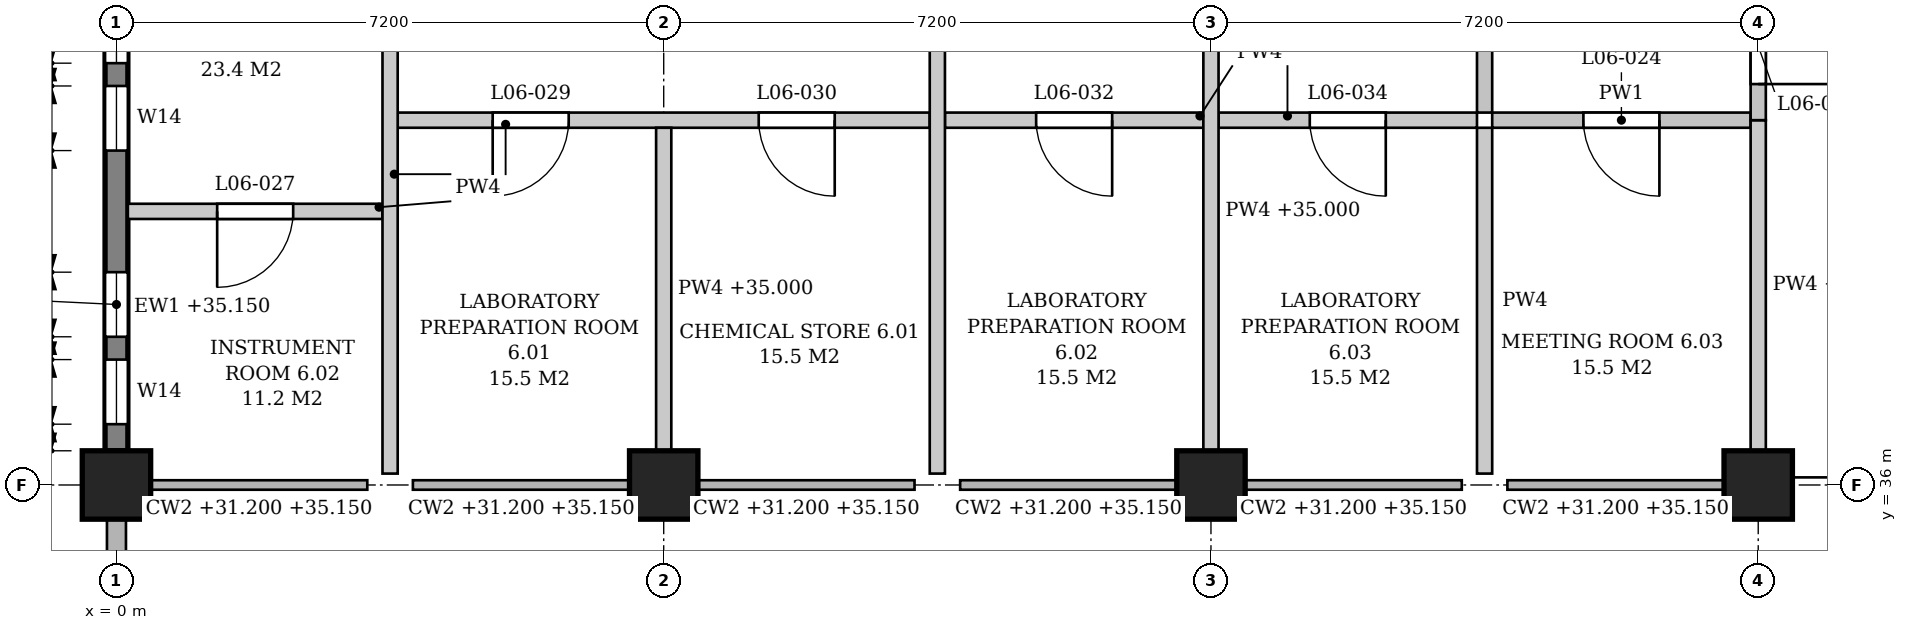
"""IFC4 building model, lengths in metres.
Left out: names, types, materials, properties, quantities, classifications, styles, units other than length and angle.
Written with IfcOpenShell. Run it as: python <this file> out.ifc"""

import sys

from ifc_helpers import new_model, si_unit, direction, frame, frame_2d, origin, origin_2d, place, context, subcontext, project, spatial, polyline, rectangle, outline, extrude, element, fill, save


model = new_model("IFC4")
c1 = context("Model", 3, precision=1e-05, world=origin(), true_north=direction((0.0, 1.0)))
c2 = subcontext(c1, "Body", "Model", "MODEL_VIEW")
j1 = project(units=[si_unit("LENGTHUNIT", "METRE"), si_unit("PLANEANGLEUNIT", "RADIAN")], contexts=[c1])
p1 = place(None, origin())
s1 = spatial("IfcSite", under=j1, at=p1, CompositionType="ELEMENT")
p2 = place(p1, origin())
s2 = spatial("IfcBuilding", under=s1, at=p2, CompositionType="ELEMENT")
p3 = place(p2, frame((0.0, 0.0, 31.2)))
s3 = spatial("IfcBuildingStorey", under=s2, at=p3, CompositionType="ELEMENT", Elevation=31.2)
for number, where, z_axis, x_axis in (
    (1, (0.0, 36.0, 0.0), (0.0, 0.0, 1.0), (1.0, 0.0, 0.0)),
    (2, (7.2, 36.0, 0.0), (0.0, 0.0, 1.0), (1.0, 0.0, 0.0)),
    (3, (14.4, 36.0, 0.0), (0.0, 0.0, 1.0), (1.0, 0.0, 0.0)),
    (4, (21.6, 36.0, 0.0), (0.0, 0.0, 1.0), (1.0, 0.0, 0.0)),
):
    element("IfcColumn", number, at=place(p3, frame(where, z_axis=z_axis, x_axis=x_axis)), inside=s3, PredefinedType="COLUMN", context=c2, shape_type="SweptSolid", body=[
        extrude(rectangle(XDim=0.9, YDim=0.9, at=origin_2d()), origin(), (0.0, 0.0, 1.0), 4.8),
    ])
p4 = place(p3, frame((0.0, 36.45, 0.0), z_axis=(0.0, 0.0, 1.0), x_axis=(0.0, 1.0, 0.0)))
e5 = element("IfcWall", 5, at=p4, inside=s3, PredefinedType="STANDARD", context=c2, shape_type="SweptSolid", body=[
    extrude(rectangle(XDim=6.3, YDim=0.3, at=frame_2d((3.15, 0.0))), origin(), (0.0, 0.0, 1.0), 3.95),
])
p5 = place(p4, frame((0.35, 0.0, 0.9)))
e6 = element("IfcOpeningElement", 6, at=p5, cuts=e5, PredefinedType="OPENING", context=c2, shape_type="SweptSolid", body=[
    extrude(outline(polyline([(0.0, 0.0), (0.85, 0.0), (0.85, 2.05), (0.425, 2.5), (0.0, 2.05), (0.0, 0.0)])), frame((0.0, 0.16, 0.0), z_axis=(0.0, -1.0, 0.0), x_axis=(1.0, 0.0, 0.0)), (0.0, 0.0, 1.0), 0.32),
])
p6 = place(p4, frame((1.5, 0.0, 0.9)))
e7 = element("IfcOpeningElement", 7, at=p6, cuts=e5, PredefinedType="OPENING", context=c2, shape_type="SweptSolid", body=[
    extrude(outline(polyline([(0.0, 0.0), (0.85, 0.0), (0.85, 2.05), (0.425, 2.5), (0.0, 2.05), (0.0, 0.0)])), frame((0.0, 0.16, 0.0), z_axis=(0.0, -1.0, 0.0), x_axis=(1.0, 0.0, 0.0)), (0.0, 0.0, 1.0), 0.32),
])
p7 = place(p4, frame((3.95, 0.0, 0.9)))
e8 = element("IfcOpeningElement", 8, at=p7, cuts=e5, PredefinedType="OPENING", context=c2, shape_type="SweptSolid", body=[
    extrude(outline(polyline([(0.0, 0.0), (0.85, 0.0), (0.85, 2.05), (0.425, 2.5), (0.0, 2.05), (0.0, 0.0)])), frame((0.0, 0.16, 0.0), z_axis=(0.0, -1.0, 0.0), x_axis=(1.0, 0.0, 0.0)), (0.0, 0.0, 1.0), 0.32),
])
p8 = place(p4, frame((5.1, 0.0, 0.9)))
e9 = element("IfcOpeningElement", 9, at=p8, cuts=e5, PredefinedType="OPENING", context=c2, shape_type="SweptSolid", body=[
    extrude(outline(polyline([(0.0, 0.0), (0.85, 0.0), (0.85, 2.05), (0.425, 2.5), (0.0, 2.05), (0.0, 0.0)])), frame((0.0, 0.16, 0.0), z_axis=(0.0, -1.0, 0.0), x_axis=(1.0, 0.0, 0.0)), (0.0, 0.0, 1.0), 0.32),
])
p9 = place(p3, frame((0.15, 39.6, 0.0), z_axis=(0.0, 0.0, 1.0), x_axis=(1.0, 0.0, 0.0)))
e10 = element("IfcWall", 10, at=p9, inside=s3, PredefinedType="PARTITIONING", context=c2, shape_type="SweptSolid", body=[
    extrude(outline(polyline([(0.0, 0.0), (3.35, 0.0), (3.35, 4.55), (0.1, 4.55), (0.1, 3.95), (0.0, 3.95), (0.0, 0.0)])), frame((0.0, 0.1, 0.0), z_axis=(0.0, -1.0, 0.0), x_axis=(1.0, 0.0, 0.0)), (0.0, 0.0, 1.0), 0.2),
])
p10 = place(p9, frame((1.175, 0.0, 0.0)))
e11 = element("IfcOpeningElement", 11, at=p10, cuts=e10, PredefinedType="OPENING", context=c2, shape_type="SweptSolid", body=[
    extrude(rectangle(XDim=1.0, YDim=2.1, at=frame_2d((0.5, 1.05))), frame((0.0, 0.11, 0.0), z_axis=(0.0, -1.0, 0.0), x_axis=(1.0, 0.0, 0.0)), (0.0, 0.0, 1.0), 0.22),
])
p11 = place(p3, frame((3.7, 40.8, 0.0), z_axis=(0.0, 0.0, 1.0), x_axis=(1.0, 0.0, 0.0)))
e12 = element("IfcWall", 12, at=p11, inside=s3, PredefinedType="PARTITIONING", context=c2, shape_type="SweptSolid", body=[
    extrude(outline(polyline([(0.0, 0.0), (7.0, 0.0), (7.0, 4.55), (3.75, 4.55), (3.75, 3.8), (3.25, 3.8), (3.25, 4.55), (0.0, 4.55), (0.0, 0.0)])), frame((0.0, 0.1, 0.0), z_axis=(0.0, -1.0, 0.0), x_axis=(1.0, 0.0, 0.0)), (0.0, 0.0, 1.0), 0.2),
])
p12 = place(p11, frame((1.25, 0.0, 0.0)))
e13 = element("IfcOpeningElement", 13, at=p12, cuts=e12, PredefinedType="OPENING", context=c2, shape_type="SweptSolid", body=[
    extrude(rectangle(XDim=1.0, YDim=2.1, at=frame_2d((0.5, 1.05))), frame((0.0, 0.11, 0.0), z_axis=(0.0, -1.0, 0.0), x_axis=(1.0, 0.0, 0.0)), (0.0, 0.0, 1.0), 0.22),
])
p13 = place(p11, frame((4.75, 0.0, 0.0)))
e14 = element("IfcOpeningElement", 14, at=p13, cuts=e12, PredefinedType="OPENING", context=c2, shape_type="SweptSolid", body=[
    extrude(rectangle(XDim=1.0, YDim=2.1, at=frame_2d((0.5, 1.05))), frame((0.0, 0.11, 0.0), z_axis=(0.0, -1.0, 0.0), x_axis=(1.0, 0.0, 0.0)), (0.0, 0.0, 1.0), 0.22),
])
p14 = place(p3, frame((10.9, 40.8, 0.0), z_axis=(0.0, 0.0, 1.0), x_axis=(1.0, 0.0, 0.0)))
e15 = element("IfcWall", 15, at=p14, inside=s3, PredefinedType="PARTITIONING", context=c2, shape_type="SweptSolid", body=[
    extrude(outline(polyline([(0.0, 0.0), (3.4, 0.0), (3.4, 3.8), (3.25, 3.8), (3.25, 4.55), (0.0, 4.55), (0.0, 0.0)])), frame((0.0, 0.1, 0.0), z_axis=(0.0, -1.0, 0.0), x_axis=(1.0, 0.0, 0.0)), (0.0, 0.0, 1.0), 0.2),
])
p15 = place(p14, frame((1.2, 0.0, 0.0)))
e16 = element("IfcOpeningElement", 16, at=p15, cuts=e15, PredefinedType="OPENING", context=c2, shape_type="SweptSolid", body=[
    extrude(rectangle(XDim=1.0, YDim=2.1, at=frame_2d((0.5, 1.05))), frame((0.0, 0.11, 0.0), z_axis=(0.0, -1.0, 0.0), x_axis=(1.0, 0.0, 0.0)), (0.0, 0.0, 1.0), 0.22),
])
p16 = place(p3, frame((14.5, 40.8, 0.0), z_axis=(0.0, 0.0, 1.0), x_axis=(1.0, 0.0, 0.0)))
e17 = element("IfcWall", 17, at=p16, inside=s3, PredefinedType="PARTITIONING", context=c2, shape_type="SweptSolid", body=[
    extrude(outline(polyline([(0.0, 0.0), (3.4, 0.0), (3.4, 4.55), (0.15, 4.55), (0.15, 3.8), (0.0, 3.8), (0.0, 0.0)])), frame((0.0, 0.1, 0.0), z_axis=(0.0, -1.0, 0.0), x_axis=(1.0, 0.0, 0.0)), (0.0, 0.0, 1.0), 0.2),
])
p17 = place(p16, frame((1.2, 0.0, 0.0)))
e18 = element("IfcOpeningElement", 18, at=p17, cuts=e17, PredefinedType="OPENING", context=c2, shape_type="SweptSolid", body=[
    extrude(rectangle(XDim=1.0, YDim=2.1, at=frame_2d((0.5, 1.05))), frame((0.0, 0.11, 0.0), z_axis=(0.0, -1.0, 0.0), x_axis=(1.0, 0.0, 0.0)), (0.0, 0.0, 1.0), 0.22),
])
p18 = place(p3, frame((18.1, 40.8, 0.0), z_axis=(0.0, 0.0, 1.0), x_axis=(1.0, 0.0, 0.0)))
e19 = element("IfcWall", 19, at=p18, inside=s3, PredefinedType="PARTITIONING", context=c2, shape_type="SweptSolid", body=[
    extrude(outline(polyline([(0.0, 0.0), (3.4, 0.0), (3.4, 3.8), (3.25, 3.8), (3.25, 4.55), (0.0, 4.55), (0.0, 0.0)])), frame((0.0, 0.1, 0.0), z_axis=(0.0, -1.0, 0.0), x_axis=(1.0, 0.0, 0.0)), (0.0, 0.0, 1.0), 0.2),
])
p19 = place(p18, frame((1.2, 0.0, 0.0)))
e20 = element("IfcOpeningElement", 20, at=p19, cuts=e19, PredefinedType="OPENING", context=c2, shape_type="SweptSolid", body=[
    extrude(rectangle(XDim=1.0, YDim=2.1, at=frame_2d((0.5, 1.05))), frame((0.0, 0.11, 0.0), z_axis=(0.0, -1.0, 0.0), x_axis=(1.0, 0.0, 0.0)), (0.0, 0.0, 1.0), 0.22),
])
p20 = place(p3, frame((3.6, 36.15, 0.0), z_axis=(0.0, 0.0, 1.0), x_axis=(0.0, 1.0, 0.0)))
e21 = element("IfcWall", 21, at=p20, inside=s3, PredefinedType="PARTITIONING", context=c2, shape_type="SweptSolid", body=[
    extrude(outline(polyline([(0.0, 0.0), (10.65, 0.0), (10.65, 4.55), (7.3, 4.55), (7.3, 3.8), (6.8, 3.8), (6.8, 4.55), (0.1, 4.55), (0.1, 3.95), (0.0, 3.95), (0.0, 0.0)])), frame((0.0, 0.1, 0.0), z_axis=(0.0, -1.0, 0.0), x_axis=(1.0, 0.0, 0.0)), (0.0, 0.0, 1.0), 0.2),
])
p21 = place(p3, frame((7.2, 36.45, 0.0), z_axis=(0.0, 0.0, 1.0), x_axis=(0.0, 1.0, 0.0)))
e22 = element("IfcWall", 22, at=p21, inside=s3, PredefinedType="PARTITIONING", context=c2, shape_type="SweptSolid", body=[
    extrude(rectangle(XDim=4.25, YDim=0.2, at=frame_2d((2.125, 0.0))), origin(), (0.0, 0.0, 1.0), 3.8),
])
p22 = place(p3, frame((10.8, 36.15, 0.0), z_axis=(0.0, 0.0, 1.0), x_axis=(0.0, 1.0, 0.0)))
e23 = element("IfcWall", 23, at=p22, inside=s3, PredefinedType="PARTITIONING", context=c2, shape_type="SweptSolid", body=[
    extrude(outline(polyline([(0.0, 0.0), (11.75, 0.0), (11.75, 4.55), (7.3, 4.55), (7.3, 3.8), (6.8, 3.8), (6.8, 4.55), (0.1, 4.55), (0.1, 3.95), (0.0, 3.95), (0.0, 0.0)])), frame((0.0, 0.1, 0.0), z_axis=(0.0, -1.0, 0.0), x_axis=(1.0, 0.0, 0.0)), (0.0, 0.0, 1.0), 0.2),
])
p23 = place(p3, frame((14.4, 36.45, 0.0), z_axis=(0.0, 0.0, 1.0), x_axis=(0.0, 1.0, 0.0)))
e24 = element("IfcWall", 24, at=p23, inside=s3, PredefinedType="PARTITIONING", context=c2, shape_type="SweptSolid", body=[
    extrude(rectangle(XDim=6.3, YDim=0.2, at=frame_2d((3.15, 0.0))), origin(), (0.0, 0.0, 1.0), 3.8),
])
p24 = place(p3, frame((18.0, 36.15, 0.0), z_axis=(0.0, 0.0, 1.0), x_axis=(0.0, 1.0, 0.0)))
e25 = element("IfcWall", 25, at=p24, inside=s3, PredefinedType="PARTITIONING", context=c2, shape_type="SweptSolid", body=[
    extrude(outline(polyline([(0.0, 0.0), (4.55, 0.0), (4.55, 4.55), (0.1, 4.55), (0.1, 3.95), (0.0, 3.95), (0.0, 0.0)])), frame((0.0, 0.1, 0.0), z_axis=(0.0, -1.0, 0.0), x_axis=(1.0, 0.0, 0.0)), (0.0, 0.0, 1.0), 0.2),
])
p25 = place(p3, frame((18.0, 40.9, 0.0), z_axis=(0.0, 0.0, 1.0), x_axis=(0.0, 1.0, 0.0)))
e26 = element("IfcWall", 26, at=p25, inside=s3, PredefinedType="PARTITIONING", context=c2, shape_type="SweptSolid", body=[
    extrude(outline(polyline([(0.0, 0.0), (7.0, 0.0), (7.0, 4.55), (2.55, 4.55), (2.55, 3.8), (2.05, 3.8), (2.05, 4.55), (0.0, 4.55), (0.0, 0.0)])), frame((0.0, 0.1, 0.0), z_axis=(0.0, -1.0, 0.0), x_axis=(1.0, 0.0, 0.0)), (0.0, 0.0, 1.0), 0.2),
])
p26 = place(p25, frame((3.0, 0.0, 0.0)))
e27 = element("IfcOpeningElement", 27, at=p26, cuts=e26, PredefinedType="OPENING", context=c2, shape_type="SweptSolid", body=[
    extrude(rectangle(XDim=1.0, YDim=2.1, at=frame_2d((0.5, 1.05))), frame((0.0, 0.11, 0.0), z_axis=(0.0, -1.0, 0.0), x_axis=(1.0, 0.0, 0.0)), (0.0, 0.0, 1.0), 0.22),
])
p27 = place(p3, frame((21.6, 36.45, 0.0), z_axis=(0.0, 0.0, 1.0), x_axis=(0.0, 1.0, 0.0)))
e28 = element("IfcWall", 28, at=p27, inside=s3, PredefinedType="PARTITIONING", context=c2, shape_type="SweptSolid", body=[
    extrude(rectangle(XDim=4.35, YDim=0.2, at=frame_2d((2.175, 0.0))), origin(), (0.0, 0.0, 1.0), 3.8),
])
p28 = place(p3, frame((21.6, 40.8, 0.0), z_axis=(0.0, 0.0, 1.0), x_axis=(0.0, 1.0, 0.0)))
e29 = element("IfcWall", 29, at=p28, inside=s3, PredefinedType="PARTITIONING", context=c2, shape_type="SweptSolid", body=[
    extrude(rectangle(XDim=1.95, YDim=0.2, at=frame_2d((0.975, 0.0))), origin(), (0.0, 0.0, 1.0), 3.8),
])
p29 = place(p28, frame((0.475, 0.0, 0.0)))
e30 = element("IfcOpeningElement", 30, at=p29, cuts=e29, PredefinedType="OPENING", context=c2, shape_type="SweptSolid", body=[
    extrude(rectangle(XDim=1.0, YDim=2.1, at=frame_2d((0.5, 1.05))), frame((0.0, 0.11, 0.0), z_axis=(0.0, -1.0, 0.0), x_axis=(1.0, 0.0, 0.0)), (0.0, 0.0, 1.0), 0.22),
])
p30 = place(p5, origin())
e31 = element("IfcWindow", 31, at=p30, inside=s3, PartitioningType="SINGLE_PANEL", PredefinedType="WINDOW", context=c2, shape_type="SweptSolid", body=[
    extrude(outline(polyline([(0.0, 0.0), (0.85, 0.0), (0.85, 2.05), (0.425, 2.5), (0.0, 2.05), (0.0, 0.0)])), frame((0.0, 0.03, 0.0), z_axis=(0.0, -1.0, 0.0), x_axis=(1.0, 0.0, 0.0)), (0.0, 0.0, 1.0), 0.06),
])
fill(e6, e31)
p31 = place(p6, origin())
e32 = element("IfcWindow", 32, at=p31, inside=s3, PartitioningType="SINGLE_PANEL", PredefinedType="WINDOW", context=c2, shape_type="SweptSolid", body=[
    extrude(outline(polyline([(0.0, 0.0), (0.85, 0.0), (0.85, 2.05), (0.425, 2.5), (0.0, 2.05), (0.0, 0.0)])), frame((0.0, 0.03, 0.0), z_axis=(0.0, -1.0, 0.0), x_axis=(1.0, 0.0, 0.0)), (0.0, 0.0, 1.0), 0.06),
])
fill(e7, e32)
p32 = place(p7, origin())
e33 = element("IfcWindow", 33, at=p32, inside=s3, PartitioningType="SINGLE_PANEL", PredefinedType="WINDOW", context=c2, shape_type="SweptSolid", body=[
    extrude(outline(polyline([(0.0, 0.0), (0.85, 0.0), (0.85, 2.05), (0.425, 2.5), (0.0, 2.05), (0.0, 0.0)])), frame((0.0, 0.03, 0.0), z_axis=(0.0, -1.0, 0.0), x_axis=(1.0, 0.0, 0.0)), (0.0, 0.0, 1.0), 0.06),
])
fill(e8, e33)
p33 = place(p8, origin())
e34 = element("IfcWindow", 34, at=p33, inside=s3, PartitioningType="SINGLE_PANEL", PredefinedType="WINDOW", context=c2, shape_type="SweptSolid", body=[
    extrude(outline(polyline([(0.0, 0.0), (0.85, 0.0), (0.85, 2.05), (0.425, 2.5), (0.0, 2.05), (0.0, 0.0)])), frame((0.0, 0.03, 0.0), z_axis=(0.0, -1.0, 0.0), x_axis=(1.0, 0.0, 0.0)), (0.0, 0.0, 1.0), 0.06),
])
fill(e9, e34)
p34 = place(p19, frame((1.0, 0.0, 0.0), z_axis=(0.0, 0.0, 1.0), x_axis=(-1.0, 0.0, 0.0)))
e35 = element("IfcDoor", 35, at=p34, inside=s3, OperationType="SINGLE_SWING_LEFT", PredefinedType="DOOR", context=c2, shape_type="SweptSolid", body=[
    extrude(rectangle(XDim=1.0, YDim=2.1, at=frame_2d((0.5, 1.05))), frame((0.0, 0.025, 0.0), z_axis=(0.0, -1.0, 0.0), x_axis=(1.0, 0.0, 0.0)), (0.0, 0.0, 1.0), 0.05),
])
fill(e20, e35)
p35 = place(p29, frame((1.0, 0.0, 0.0), z_axis=(0.0, 0.0, 1.0), x_axis=(-1.0, 0.0, 0.0)))
e36 = element("IfcDoor", 36, at=p35, inside=s3, OperationType="SINGLE_SWING_RIGHT", PredefinedType="DOOR", context=c2, shape_type="SweptSolid", body=[
    extrude(rectangle(XDim=1.0, YDim=2.1, at=frame_2d((0.5, 1.05))), frame((0.0, 0.025, 0.0), z_axis=(0.0, -1.0, 0.0), x_axis=(1.0, 0.0, 0.0)), (0.0, 0.0, 1.0), 0.05),
])
fill(e30, e36)
p36 = place(p10, frame((1.0, 0.0, 0.0), z_axis=(0.0, 0.0, 1.0), x_axis=(-1.0, 0.0, 0.0)))
e37 = element("IfcDoor", 37, at=p36, inside=s3, OperationType="SINGLE_SWING_RIGHT", PredefinedType="DOOR", context=c2, shape_type="SweptSolid", body=[
    extrude(rectangle(XDim=1.0, YDim=2.1, at=frame_2d((0.5, 1.05))), frame((0.0, 0.025, 0.0), z_axis=(0.0, -1.0, 0.0), x_axis=(1.0, 0.0, 0.0)), (0.0, 0.0, 1.0), 0.05),
])
fill(e11, e37)
p37 = place(p12, frame((1.0, 0.0, 0.0), z_axis=(0.0, 0.0, 1.0), x_axis=(-1.0, 0.0, 0.0)))
e38 = element("IfcDoor", 38, at=p37, inside=s3, OperationType="SINGLE_SWING_RIGHT", PredefinedType="DOOR", context=c2, shape_type="SweptSolid", body=[
    extrude(rectangle(XDim=1.0, YDim=2.1, at=frame_2d((0.5, 1.05))), frame((0.0, 0.025, 0.0), z_axis=(0.0, -1.0, 0.0), x_axis=(1.0, 0.0, 0.0)), (0.0, 0.0, 1.0), 0.05),
])
fill(e13, e38)
p38 = place(p13, frame((1.0, 0.0, 0.0), z_axis=(0.0, 0.0, 1.0), x_axis=(-1.0, 0.0, 0.0)))
e39 = element("IfcDoor", 39, at=p38, inside=s3, OperationType="SINGLE_SWING_LEFT", PredefinedType="DOOR", context=c2, shape_type="SweptSolid", body=[
    extrude(rectangle(XDim=1.0, YDim=2.1, at=frame_2d((0.5, 1.05))), frame((0.0, 0.025, 0.0), z_axis=(0.0, -1.0, 0.0), x_axis=(1.0, 0.0, 0.0)), (0.0, 0.0, 1.0), 0.05),
])
fill(e14, e39)
p39 = place(p15, frame((1.0, 0.0, 0.0), z_axis=(0.0, 0.0, 1.0), x_axis=(-1.0, 0.0, 0.0)))
e40 = element("IfcDoor", 40, at=p39, inside=s3, OperationType="SINGLE_SWING_LEFT", PredefinedType="DOOR", context=c2, shape_type="SweptSolid", body=[
    extrude(rectangle(XDim=1.0, YDim=2.1, at=frame_2d((0.5, 1.05))), frame((0.0, 0.025, 0.0), z_axis=(0.0, -1.0, 0.0), x_axis=(1.0, 0.0, 0.0)), (0.0, 0.0, 1.0), 0.05),
])
fill(e16, e40)
p40 = place(p17, frame((1.0, 0.0, 0.0), z_axis=(0.0, 0.0, 1.0), x_axis=(-1.0, 0.0, 0.0)))
e41 = element("IfcDoor", 41, at=p40, inside=s3, OperationType="SINGLE_SWING_LEFT", PredefinedType="DOOR", context=c2, shape_type="SweptSolid", body=[
    extrude(rectangle(XDim=1.0, YDim=2.1, at=frame_2d((0.5, 1.05))), frame((0.0, 0.025, 0.0), z_axis=(0.0, -1.0, 0.0), x_axis=(1.0, 0.0, 0.0)), (0.0, 0.0, 1.0), 0.05),
])
fill(e18, e41)
save(model, sys.argv[1])
